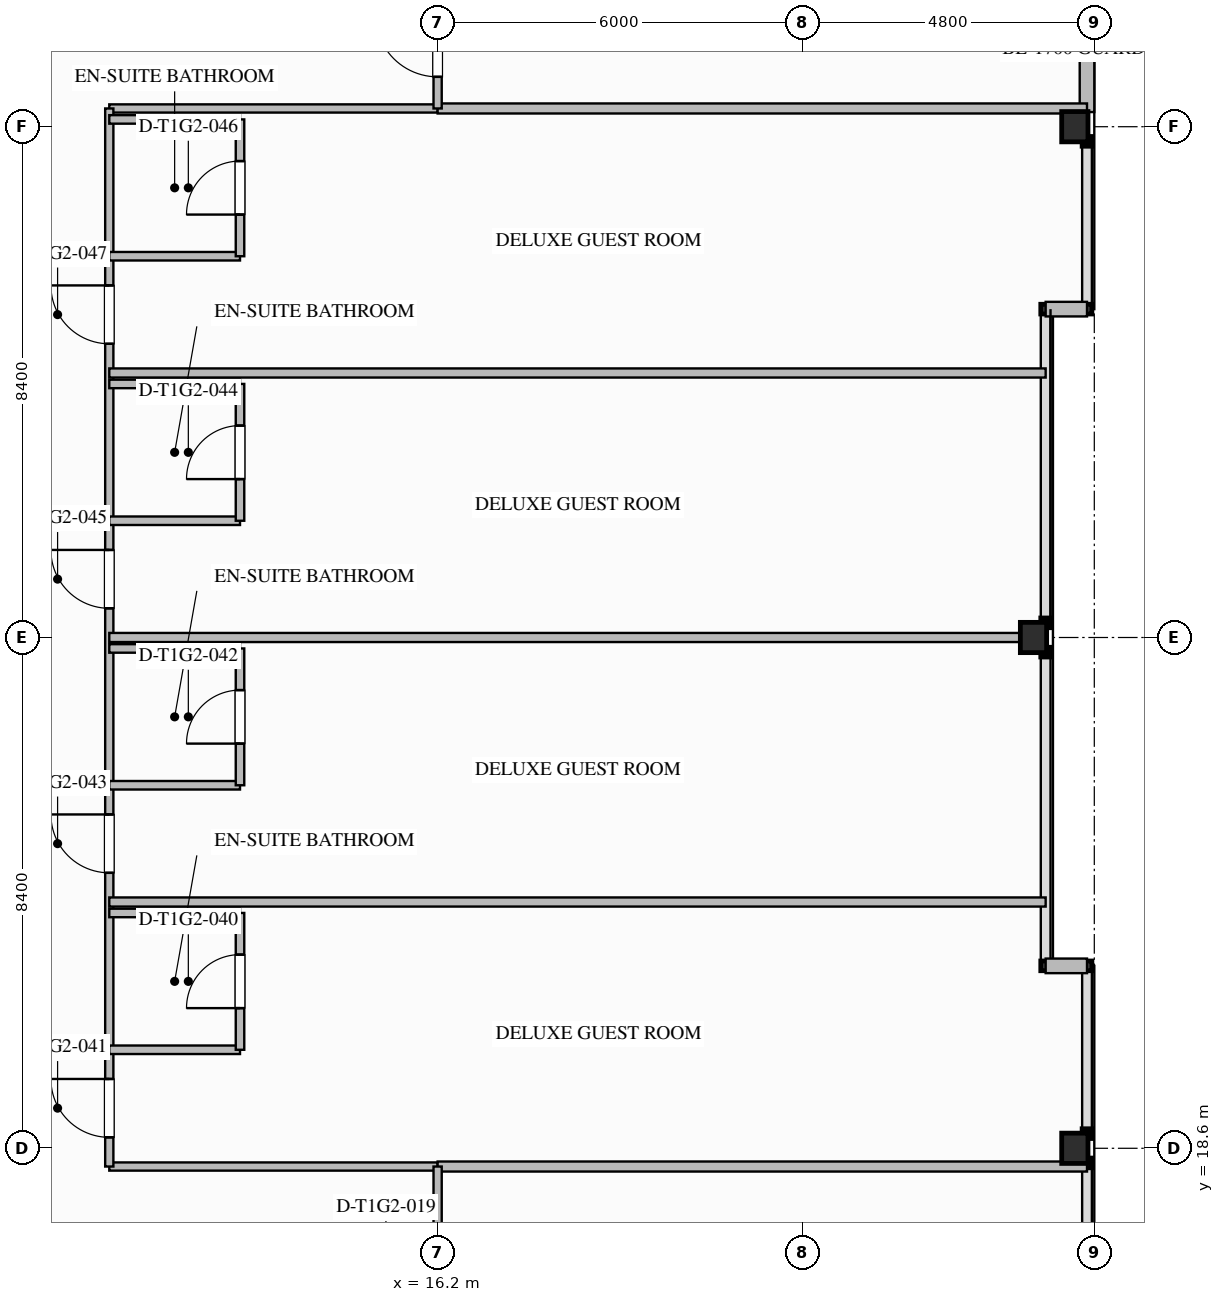
"""IFC4 building model, lengths in metres.
Left out: names, types, materials, properties, quantities, classifications, styles, units other than length and angle.
Written with IfcOpenShell. Run it as: python <this file> out.ifc"""

import sys

from ifc_helpers import new_model, si_unit, direction, frame, frame_2d, origin, origin_2d, place, context, subcontext, project, spatial, rectangle, i_section, extrude, element, fill, save


model = new_model("IFC4")
c1 = context("Model", 3, precision=1e-05, world=origin(), true_north=direction((0.0, 1.0)))
c2 = subcontext(c1, "Body", "Model", "MODEL_VIEW")
j1 = project(units=[si_unit("LENGTHUNIT", "METRE"), si_unit("PLANEANGLEUNIT", "RADIAN")], contexts=[c1])
p1 = place(None, origin())
s1 = spatial("IfcSite", under=j1, at=p1, CompositionType="ELEMENT")
p2 = place(p1, origin())
s2 = spatial("IfcBuilding", under=s1, at=p2, CompositionType="ELEMENT")
p3 = place(p2, frame((0.0, 0.0, 43.7)))
s3 = spatial("IfcBuildingStorey", under=s2, at=p3, CompositionType="ELEMENT", Elevation=43.7)
for number, where, z_axis, x_axis in (
    (1, (26.68, 18.6, 0.0), (0.0, 0.0, 1.0), (1.0, 0.0, 0.0)),
    (2, (26.0, 27.0, 0.0), (0.0, 0.0, 1.0), (1.0, 0.0, 0.0)),
    (3, (26.68, 35.4, 0.0), (0.0, 0.0, 1.0), (1.0, 0.0, 0.0)),
):
    element("IfcColumn", number, at=place(p3, frame(where, z_axis=z_axis, x_axis=x_axis)), inside=s3, PredefinedType="COLUMN", context=c2, shape_type="SweptSolid", body=[
        extrude(i_section(OverallWidth=0.432, OverallDepth=0.498, WebThickness=0.056, FlangeThickness=0.089, FilletRadius=0.03, at=origin_2d()), origin(), (0.0, 0.0, 1.0), 3.497),
    ])
p4 = place(p3, frame((26.88, 42.959, 0.0), z_axis=(0.0, 0.0, 1.0), x_axis=(0.0, -1.0, 0.0)))
e4 = element("IfcWall", 4, at=p4, inside=s3, PredefinedType="STANDARD", context=c2, shape_type="SweptSolid", body=[
    extrude(rectangle(XDim=7.318, YDim=0.24, at=frame_2d((3.659, 0.0))), origin(), (0.0, 0.0, 1.0), 2.629),
])
p5 = place(p4, frame((1.759, 0.0, 0.0)))
e5 = element("IfcOpeningElement", 5, at=p5, cuts=e4, PredefinedType="OPENING", context=c2, shape_type="SweptSolid", body=[
    extrude(rectangle(XDim=1.0, YDim=2.2, at=frame_2d((0.5, 1.1))), frame((0.0, 0.13, 0.0), z_axis=(0.0, -1.0, 0.0), x_axis=(1.0, 0.0, 0.0)), (0.0, 0.0, 1.0), 0.26),
])
p6 = place(p4, frame((3.966, 0.0, 0.75)))
e6 = element("IfcOpeningElement", 6, at=p6, cuts=e4, PredefinedType="OPENING", context=c2, shape_type="SweptSolid", body=[
    extrude(rectangle(XDim=1.8, YDim=1.779, at=frame_2d((0.9, 0.89))), frame((0.0, 0.13, 0.0), z_axis=(0.0, -1.0, 0.0), x_axis=(1.0, 0.0, 0.0)), (0.0, 0.0, 1.0), 0.26),
])
for number, where, z_axis, x_axis in (
    (7, (26.88, 32.4, 0.0), (0.0, 0.0, 1.0), (-1.0, 0.0, 0.0)),
    (8, (26.2, 21.6, 0.0), (0.0, 0.0, 1.0), (1.0, 0.0, 0.0)),
):
    element("IfcWall", number, at=place(p3, frame(where, z_axis=z_axis, x_axis=x_axis)), inside=s3, PredefinedType="STANDARD", context=c2, shape_type="SweptSolid", body=[
        extrude(rectangle(XDim=0.68, YDim=0.24, at=frame_2d((0.34, 0.0))), origin(), (0.0, 0.0, 1.0), 3.24),
    ])
for number, where, z_axis, x_axis in (
    (9, (10.8, 18.3, 0.0), (0.0, 0.0, 1.0), (1.0, 0.0, 0.0)),
    (10, (10.8, 35.7, 0.0), (0.0, 0.0, 1.0), (1.0, 0.0, 0.0)),
):
    element("IfcWall", number, at=place(p3, frame(where, z_axis=z_axis, x_axis=x_axis)), inside=s3, PredefinedType="PARTITIONING", context=c2, shape_type="SweptSolid", body=[
        extrude(rectangle(XDim=5.4, YDim=0.135, at=frame_2d((2.7, 0.0))), origin(), (0.0, 0.0, 1.0), 3.24),
    ])
p7 = place(p3, frame((10.8, 18.3, 0.0), z_axis=(0.0, 0.0, 1.0), x_axis=(0.0, 1.0, 0.0)))
e11 = element("IfcWall", 11, at=p7, inside=s3, PredefinedType="PARTITIONING", context=c2, shape_type="SweptSolid", body=[
    extrude(rectangle(XDim=17.4, YDim=0.135, at=frame_2d((8.7, 0.0))), origin(), (0.0, 0.0, 1.0), 3.24),
])
p8 = place(p7, frame((0.48, 0.0, 0.0)))
e12 = element("IfcOpeningElement", 12, at=p8, cuts=e11, PredefinedType="OPENING", context=c2, shape_type="SweptSolid", body=[
    extrude(rectangle(XDim=0.96, YDim=2.15, at=frame_2d((0.48, 1.075))), frame((0.0, 0.077, 0.0), z_axis=(0.0, -1.0, 0.0), x_axis=(1.0, 0.0, 0.0)), (0.0, 0.0, 1.0), 0.155),
])
p9 = place(p7, frame((4.83, 0.0, 0.0)))
e13 = element("IfcOpeningElement", 13, at=p9, cuts=e11, PredefinedType="OPENING", context=c2, shape_type="SweptSolid", body=[
    extrude(rectangle(XDim=0.96, YDim=2.15, at=frame_2d((0.48, 1.075))), frame((0.0, 0.077, 0.0), z_axis=(0.0, -1.0, 0.0), x_axis=(1.0, 0.0, 0.0)), (0.0, 0.0, 1.0), 0.155),
])
p10 = place(p7, frame((9.18, 0.0, 0.0)))
e14 = element("IfcOpeningElement", 14, at=p10, cuts=e11, PredefinedType="OPENING", context=c2, shape_type="SweptSolid", body=[
    extrude(rectangle(XDim=0.96, YDim=2.15, at=frame_2d((0.48, 1.075))), frame((0.0, 0.077, 0.0), z_axis=(0.0, -1.0, 0.0), x_axis=(1.0, 0.0, 0.0)), (0.0, 0.0, 1.0), 0.155),
])
p11 = place(p7, frame((13.53, 0.0, 0.0)))
e15 = element("IfcOpeningElement", 15, at=p11, cuts=e11, PredefinedType="OPENING", context=c2, shape_type="SweptSolid", body=[
    extrude(rectangle(XDim=0.96, YDim=2.15, at=frame_2d((0.48, 1.075))), frame((0.0, 0.077, 0.0), z_axis=(0.0, -1.0, 0.0), x_axis=(1.0, 0.0, 0.0)), (0.0, 0.0, 1.0), 0.155),
])
for number, where, z_axis, x_axis in (
    (16, (16.2, 18.3, 0.0), (0.0, 0.0, 1.0), (1.0, 0.0, 0.0)),
    (17, (16.2, 35.7, 0.0), (0.0, 0.0, 1.0), (1.0, 0.0, 0.0)),
):
    element("IfcWall", number, at=place(p3, frame(where, z_axis=z_axis, x_axis=x_axis)), inside=s3, PredefinedType="PARTITIONING", context=c2, shape_type="SweptSolid", body=[
        extrude(rectangle(XDim=10.68, YDim=0.165, at=frame_2d((5.34, 0.0))), origin(), (0.0, 0.0, 1.0), 2.298),
    ])
p12 = place(p3, frame((16.2, 15.6, 0.0), z_axis=(0.0, 0.0, 1.0), x_axis=(0.0, 1.0, 0.0)))
e18 = element("IfcWall", 18, at=p12, inside=s3, PredefinedType="PARTITIONING", context=c2, shape_type="SweptSolid", body=[
    extrude(rectangle(XDim=2.7, YDim=0.135, at=frame_2d((1.35, 0.0))), origin(), (0.0, 0.0, 1.0), 2.298),
])
p13 = place(p12, frame((0.52, 0.0, 0.0)))
e19 = element("IfcOpeningElement", 19, at=p13, cuts=e18, PredefinedType="OPENING", context=c2, shape_type="SweptSolid", body=[
    extrude(rectangle(XDim=1.02, YDim=2.15, at=frame_2d((0.51, 1.075))), frame((0.0, 0.077, 0.0), z_axis=(0.0, -1.0, 0.0), x_axis=(1.0, 0.0, 0.0)), (0.0, 0.0, 1.0), 0.155),
])
p14 = place(p3, frame((16.2, 35.7, 0.0), z_axis=(0.0, 0.0, 1.0), x_axis=(0.0, 1.0, 0.0)))
e20 = element("IfcWall", 20, at=p14, inside=s3, PredefinedType="PARTITIONING", context=c2, shape_type="SweptSolid", body=[
    extrude(rectangle(XDim=2.1, YDim=0.135, at=frame_2d((1.05, 0.0))), origin(), (0.0, 0.0, 1.0), 2.298),
])
p15 = place(p14, frame((0.52, 0.0, 0.0)))
e21 = element("IfcOpeningElement", 21, at=p15, cuts=e20, PredefinedType="OPENING", context=c2, shape_type="SweptSolid", body=[
    extrude(rectangle(XDim=1.02, YDim=2.15, at=frame_2d((0.51, 1.075))), frame((0.0, 0.077, 0.0), z_axis=(0.0, -1.0, 0.0), x_axis=(1.0, 0.0, 0.0)), (0.0, 0.0, 1.0), 0.155),
])
for number, where, z_axis, x_axis in (
    (22, (10.8, 20.22, 0.0), (0.0, 0.0, 1.0), (1.0, 0.0, 0.0)),
    (23, (10.8, 22.47, 0.0), (0.0, 0.0, 1.0), (1.0, 0.0, 0.0)),
):
    element("IfcWall", number, at=place(p3, frame(where, z_axis=z_axis, x_axis=x_axis)), inside=s3, PredefinedType="PLUMBINGWALL", context=c2, shape_type="SweptSolid", body=[
        extrude(rectangle(XDim=2.15, YDim=0.14, at=frame_2d((1.075, 0.0))), origin(), (0.0, 0.0, 1.0), 3.24),
    ])
p16 = place(p3, frame((12.95, 20.22, 0.0), z_axis=(0.0, 0.0, 1.0), x_axis=(0.0, 1.0, 0.0)))
e24 = element("IfcWall", 24, at=p16, inside=s3, PredefinedType="PLUMBINGWALL", context=c2, shape_type="SweptSolid", body=[
    extrude(rectangle(XDim=2.25, YDim=0.14, at=frame_2d((1.125, 0.0))), origin(), (0.0, 0.0, 1.0), 3.24),
])
p17 = place(p16, frame((0.685, 0.0, 0.0)))
e25 = element("IfcOpeningElement", 25, at=p17, cuts=e24, PredefinedType="OPENING", context=c2, shape_type="SweptSolid", body=[
    extrude(rectangle(XDim=0.88, YDim=2.1, at=frame_2d((0.44, 1.05))), frame((0.0, 0.08, 0.0), z_axis=(0.0, -1.0, 0.0), x_axis=(1.0, 0.0, 0.0)), (0.0, 0.0, 1.0), 0.16),
])
p18 = place(p3, frame((10.8, 22.65, 0.0), z_axis=(0.0, 0.0, 1.0), x_axis=(1.0, 0.0, 0.0)))
e26 = element("IfcWall", 26, at=p18, inside=s3, PredefinedType="PARTITIONING", context=c2, shape_type="SweptSolid", body=[
    extrude(rectangle(XDim=15.4, YDim=0.15, at=frame_2d((7.7, 0.0))), origin(), (0.0, 0.0, 1.0), 3.24),
])
p19 = place(p3, frame((10.8, 24.57, 0.0), z_axis=(0.0, 0.0, 1.0), x_axis=(1.0, 0.0, 0.0)))
e27 = element("IfcWall", 27, at=p19, inside=s3, PredefinedType="PLUMBINGWALL", context=c2, shape_type="SweptSolid", body=[
    extrude(rectangle(XDim=2.15, YDim=0.14, at=frame_2d((1.075, 0.0))), origin(), (0.0, 0.0, 1.0), 3.24),
])
p20 = place(p3, frame((10.8, 26.82, 0.0), z_axis=(0.0, 0.0, 1.0), x_axis=(1.0, 0.0, 0.0)))
e28 = element("IfcWall", 28, at=p20, inside=s3, PredefinedType="PLUMBINGWALL", context=c2, shape_type="SweptSolid", body=[
    extrude(rectangle(XDim=2.15, YDim=0.14, at=frame_2d((1.075, 0.0))), origin(), (0.0, 0.0, 1.0), 2.617),
])
p21 = place(p3, frame((12.95, 24.57, 0.0), z_axis=(0.0, 0.0, 1.0), x_axis=(0.0, 1.0, 0.0)))
e29 = element("IfcWall", 29, at=p21, inside=s3, PredefinedType="PLUMBINGWALL", context=c2, shape_type="SweptSolid", body=[
    extrude(rectangle(XDim=2.25, YDim=0.14, at=frame_2d((1.125, 0.0))), origin(), (0.0, 0.0, 1.0), 3.24),
])
p22 = place(p21, frame((0.685, 0.0, 0.0)))
e30 = element("IfcOpeningElement", 30, at=p22, cuts=e29, PredefinedType="OPENING", context=c2, shape_type="SweptSolid", body=[
    extrude(rectangle(XDim=0.88, YDim=2.1, at=frame_2d((0.44, 1.05))), frame((0.0, 0.08, 0.0), z_axis=(0.0, -1.0, 0.0), x_axis=(1.0, 0.0, 0.0)), (0.0, 0.0, 1.0), 0.16),
])
p23 = place(p3, frame((10.8, 27.0, 0.0), z_axis=(0.0, 0.0, 1.0), x_axis=(1.0, 0.0, 0.0)))
e31 = element("IfcWall", 31, at=p23, inside=s3, PredefinedType="PARTITIONING", context=c2, shape_type="SweptSolid", body=[
    extrude(rectangle(XDim=15.4, YDim=0.15, at=frame_2d((7.7, 0.0))), origin(), (0.0, 0.0, 1.0), 2.298),
])
for number, where, z_axis, x_axis in (
    (32, (10.8, 28.92, 0.0), (0.0, 0.0, 1.0), (1.0, 0.0, 0.0)),
    (33, (10.8, 31.17, 0.0), (0.0, 0.0, 1.0), (1.0, 0.0, 0.0)),
):
    element("IfcWall", number, at=place(p3, frame(where, z_axis=z_axis, x_axis=x_axis)), inside=s3, PredefinedType="PLUMBINGWALL", context=c2, shape_type="SweptSolid", body=[
        extrude(rectangle(XDim=2.15, YDim=0.14, at=frame_2d((1.075, 0.0))), origin(), (0.0, 0.0, 1.0), 3.24),
    ])
p24 = place(p3, frame((12.95, 28.92, 0.0), z_axis=(0.0, 0.0, 1.0), x_axis=(0.0, 1.0, 0.0)))
e34 = element("IfcWall", 34, at=p24, inside=s3, PredefinedType="PLUMBINGWALL", context=c2, shape_type="SweptSolid", body=[
    extrude(rectangle(XDim=2.25, YDim=0.14, at=frame_2d((1.125, 0.0))), origin(), (0.0, 0.0, 1.0), 3.24),
])
p25 = place(p24, frame((0.685, 0.0, 0.0)))
e35 = element("IfcOpeningElement", 35, at=p25, cuts=e34, PredefinedType="OPENING", context=c2, shape_type="SweptSolid", body=[
    extrude(rectangle(XDim=0.88, YDim=2.1, at=frame_2d((0.44, 1.05))), frame((0.0, 0.08, 0.0), z_axis=(0.0, -1.0, 0.0), x_axis=(1.0, 0.0, 0.0)), (0.0, 0.0, 1.0), 0.16),
])
p26 = place(p3, frame((10.8, 31.35, 0.0), z_axis=(0.0, 0.0, 1.0), x_axis=(1.0, 0.0, 0.0)))
e36 = element("IfcWall", 36, at=p26, inside=s3, PredefinedType="PARTITIONING", context=c2, shape_type="SweptSolid", body=[
    extrude(rectangle(XDim=15.4, YDim=0.15, at=frame_2d((7.7, 0.0))), origin(), (0.0, 0.0, 1.0), 3.24),
])
p27 = place(p3, frame((10.8, 33.27, 0.0), z_axis=(0.0, 0.0, 1.0), x_axis=(1.0, 0.0, 0.0)))
e37 = element("IfcWall", 37, at=p27, inside=s3, PredefinedType="PLUMBINGWALL", context=c2, shape_type="SweptSolid", body=[
    extrude(rectangle(XDim=2.15, YDim=0.14, at=frame_2d((1.075, 0.0))), origin(), (0.0, 0.0, 1.0), 3.24),
])
p28 = place(p3, frame((10.8, 35.52, 0.0), z_axis=(0.0, 0.0, 1.0), x_axis=(1.0, 0.0, 0.0)))
e38 = element("IfcWall", 38, at=p28, inside=s3, PredefinedType="PLUMBINGWALL", context=c2, shape_type="SweptSolid", body=[
    extrude(rectangle(XDim=2.15, YDim=0.14, at=frame_2d((1.075, 0.0))), origin(), (0.0, 0.0, 1.0), 2.617),
])
p29 = place(p3, frame((12.95, 33.27, 0.0), z_axis=(0.0, 0.0, 1.0), x_axis=(0.0, 1.0, 0.0)))
e39 = element("IfcWall", 39, at=p29, inside=s3, PredefinedType="PLUMBINGWALL", context=c2, shape_type="SweptSolid", body=[
    extrude(rectangle(XDim=2.25, YDim=0.14, at=frame_2d((1.125, 0.0))), origin(), (0.0, 0.0, 1.0), 3.24),
])
p30 = place(p29, frame((0.685, 0.0, 0.0)))
e40 = element("IfcOpeningElement", 40, at=p30, cuts=e39, PredefinedType="OPENING", context=c2, shape_type="SweptSolid", body=[
    extrude(rectangle(XDim=0.88, YDim=2.1, at=frame_2d((0.44, 1.05))), frame((0.0, 0.08, 0.0), z_axis=(0.0, -1.0, 0.0), x_axis=(1.0, 0.0, 0.0)), (0.0, 0.0, 1.0), 0.16),
])
p31 = place(p15, origin())
e41 = element("IfcDoor", 41, at=p31, inside=s3, OperationType="SINGLE_SWING_RIGHT", PredefinedType="DOOR", context=c2, shape_type="SweptSolid", body=[
    extrude(rectangle(XDim=1.02, YDim=2.15, at=frame_2d((0.51, 1.075))), frame((0.0, 0.025, 0.0), z_axis=(0.0, -1.0, 0.0), x_axis=(1.0, 0.0, 0.0)), (0.0, 0.0, 1.0), 0.05),
])
fill(e21, e41)
p32 = place(p17, origin())
e42 = element("IfcDoor", 42, at=p32, inside=s3, OperationType="SINGLE_SWING_LEFT", PredefinedType="DOOR", context=c2, shape_type="SweptSolid", body=[
    extrude(rectangle(XDim=0.88, YDim=2.1, at=frame_2d((0.44, 1.05))), frame((0.0, 0.025, 0.0), z_axis=(0.0, -1.0, 0.0), x_axis=(1.0, 0.0, 0.0)), (0.0, 0.0, 1.0), 0.05),
])
fill(e25, e42)
p33 = place(p8, origin())
e43 = element("IfcDoor", 43, at=p33, inside=s3, OperationType="SINGLE_SWING_RIGHT", PredefinedType="DOOR", context=c2, shape_type="SweptSolid", body=[
    extrude(rectangle(XDim=0.96, YDim=2.15, at=frame_2d((0.48, 1.075))), frame((0.0, 0.025, 0.0), z_axis=(0.0, -1.0, 0.0), x_axis=(1.0, 0.0, 0.0)), (0.0, 0.0, 1.0), 0.05),
])
fill(e12, e43)
p34 = place(p22, origin())
e44 = element("IfcDoor", 44, at=p34, inside=s3, OperationType="SINGLE_SWING_LEFT", PredefinedType="DOOR", context=c2, shape_type="SweptSolid", body=[
    extrude(rectangle(XDim=0.88, YDim=2.1, at=frame_2d((0.44, 1.05))), frame((0.0, 0.025, 0.0), z_axis=(0.0, -1.0, 0.0), x_axis=(1.0, 0.0, 0.0)), (0.0, 0.0, 1.0), 0.05),
])
fill(e30, e44)
p35 = place(p9, origin())
e45 = element("IfcDoor", 45, at=p35, inside=s3, OperationType="SINGLE_SWING_RIGHT", PredefinedType="DOOR", context=c2, shape_type="SweptSolid", body=[
    extrude(rectangle(XDim=0.96, YDim=2.15, at=frame_2d((0.48, 1.075))), frame((0.0, 0.025, 0.0), z_axis=(0.0, -1.0, 0.0), x_axis=(1.0, 0.0, 0.0)), (0.0, 0.0, 1.0), 0.05),
])
fill(e13, e45)
p36 = place(p25, origin())
e46 = element("IfcDoor", 46, at=p36, inside=s3, OperationType="SINGLE_SWING_LEFT", PredefinedType="DOOR", context=c2, shape_type="SweptSolid", body=[
    extrude(rectangle(XDim=0.88, YDim=2.1, at=frame_2d((0.44, 1.05))), frame((0.0, 0.025, 0.0), z_axis=(0.0, -1.0, 0.0), x_axis=(1.0, 0.0, 0.0)), (0.0, 0.0, 1.0), 0.05),
])
fill(e35, e46)
p37 = place(p10, origin())
e47 = element("IfcDoor", 47, at=p37, inside=s3, OperationType="SINGLE_SWING_RIGHT", PredefinedType="DOOR", context=c2, shape_type="SweptSolid", body=[
    extrude(rectangle(XDim=0.96, YDim=2.15, at=frame_2d((0.48, 1.075))), frame((0.0, 0.025, 0.0), z_axis=(0.0, -1.0, 0.0), x_axis=(1.0, 0.0, 0.0)), (0.0, 0.0, 1.0), 0.05),
])
fill(e14, e47)
p38 = place(p30, origin())
e48 = element("IfcDoor", 48, at=p38, inside=s3, OperationType="SINGLE_SWING_LEFT", PredefinedType="DOOR", context=c2, shape_type="SweptSolid", body=[
    extrude(rectangle(XDim=0.88, YDim=2.1, at=frame_2d((0.44, 1.05))), frame((0.0, 0.025, 0.0), z_axis=(0.0, -1.0, 0.0), x_axis=(1.0, 0.0, 0.0)), (0.0, 0.0, 1.0), 0.05),
])
fill(e40, e48)
p39 = place(p11, origin())
e49 = element("IfcDoor", 49, at=p39, inside=s3, OperationType="SINGLE_SWING_RIGHT", PredefinedType="DOOR", context=c2, shape_type="SweptSolid", body=[
    extrude(rectangle(XDim=0.96, YDim=2.15, at=frame_2d((0.48, 1.075))), frame((0.0, 0.025, 0.0), z_axis=(0.0, -1.0, 0.0), x_axis=(1.0, 0.0, 0.0)), (0.0, 0.0, 1.0), 0.05),
])
fill(e15, e49)
save(model, sys.argv[1])
